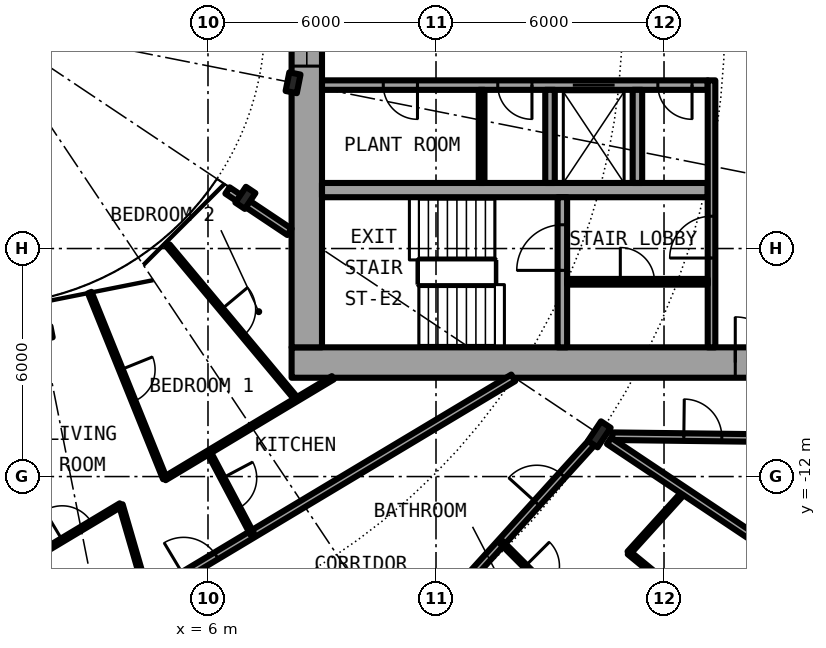
"""IFC4 building model, lengths in metres.
Left out: names, types, materials, properties, quantities, classifications, styles, units other than length and angle.
Written with IfcOpenShell. Run it as: python <this file> out.ifc"""

import sys

from ifc_helpers import new_model, si_unit, direction, frame, frame_2d, origin, origin_2d, place, context, subcontext, project, spatial, rectangle, i_section, extrude, element, fill, save


model = new_model("IFC4")
c1 = context("Model", 3, precision=1e-05, world=origin(), true_north=direction((0.0, 1.0)))
c2 = subcontext(c1, "Body", "Model", "MODEL_VIEW")
j1 = project(units=[si_unit("LENGTHUNIT", "METRE"), si_unit("PLANEANGLEUNIT", "RADIAN")], contexts=[c1])
p1 = place(None, origin())
s1 = spatial("IfcSite", under=j1, at=p1, CompositionType="ELEMENT")
p2 = place(p1, origin())
s2 = spatial("IfcBuilding", under=s1, at=p2, CompositionType="ELEMENT")
p3 = place(p2, frame((0.0, 0.0, 50.25)))
s3 = spatial("IfcBuildingStorey", under=s2, at=p3, CompositionType="ELEMENT", Elevation=50.25)
p4 = place(p3, frame((16.297, -10.889, 0.0), z_axis=(0.0, 0.0, 1.0), x_axis=(0.831469612303, -0.55557023302, 0.0)))
e1 = element("IfcColumn", 1, at=p4, inside=s3, PredefinedType="COLUMN", context=c2, shape_type="SweptSolid", body=[
    extrude(i_section(OverallWidth=0.305, OverallDepth=0.62, WebThickness=0.021, FlangeThickness=0.04, FilletRadius=0.027, at=origin_2d()), origin(), (0.0, 0.0, 1.0), 3.05),
])
for number, where, z_axis, x_axis in (
    (2, (1.639, -8.239, 0.0), (0.0, 0.0, 1.0), (0.195, -0.981, 0.0)),
    (3, (6.984, -4.667, 0.0), (0.0, 0.0, 1.0), (0.831, -0.556, 0.0)),
    (4, (8.239, -1.639, 0.0), (0.0, 0.0, 1.0), (0.981, -0.195, 0.0)),
):
    element("IfcColumn", number, at=place(p3, frame(where, z_axis=z_axis, x_axis=x_axis)), inside=s3, PredefinedType="COLUMN", context=c2, shape_type="SweptSolid", body=[
        extrude(i_section(OverallWidth=0.3, OverallDepth=0.5, WebThickness=0.014, FlangeThickness=0.028, FilletRadius=0.027, at=origin_2d()), origin(), (0.0, 0.0, 1.0), 3.05),
    ])
p5 = place(p3, frame((8.2, -9.0, 0.0), z_axis=(0.0, 0.0, 1.0), x_axis=(1.0, 0.0, 0.0)))
e5 = element("IfcWall", 5, at=p5, inside=s3, PredefinedType="SHEAR", context=c2, shape_type="SweptSolid", body=[
    extrude(rectangle(XDim=14.2, YDim=0.8, at=frame_2d((7.1, 0.0))), origin(), (0.0, 0.0, 1.0), 3.05),
])
p6 = place(p5, frame((11.675, 0.0, 0.0)))
e6 = element("IfcOpeningElement", 6, at=p6, cuts=e5, PredefinedType="OPENING", context=c2, shape_type="SweptSolid", body=[
    extrude(rectangle(XDim=1.2, YDim=2.3, at=frame_2d((0.6, 1.15))), frame((0.0, 0.41, 0.0), z_axis=(0.0, -1.0, 0.0), x_axis=(1.0, 0.0, 0.0)), (0.0, 0.0, 1.0), 0.82),
])
p7 = place(p3, frame((8.6, -8.6, 0.0), z_axis=(0.0, 0.0, 1.0), x_axis=(0.0, 1.0, 0.0)))
e7 = element("IfcWall", 7, at=p7, inside=s3, PredefinedType="SHEAR", context=c2, shape_type="SweptSolid", body=[
    extrude(rectangle(XDim=17.2, YDim=0.8, at=frame_2d((8.6, 0.0))), origin(), (0.0, 0.0, 1.0), 3.05),
])
p8 = place(p7, frame((7.4, 0.0, 0.1)))
e8 = element("IfcOpeningElement", 8, at=p8, cuts=e7, PredefinedType="OPENING", context=c2, shape_type="SweptSolid", body=[
    extrude(rectangle(XDim=2.4, YDim=2.2, at=frame_2d((1.2, 1.1))), frame((0.0, 0.41, 0.0), z_axis=(0.0, -1.0, 0.0), x_axis=(1.0, 0.0, 0.0)), (0.0, 0.0, 1.0), 0.82),
])
p9 = place(p3, frame((19.15, -1.7, 0.0), z_axis=(0.0, 0.0, 1.0), x_axis=(-1.0, 0.0, 0.0)))
e9 = element("IfcWall", 9, at=p9, inside=s3, PredefinedType="SHEAR", context=c2, shape_type="SweptSolid", body=[
    extrude(rectangle(XDim=10.15, YDim=0.25, at=frame_2d((5.075, 0.0))), origin(), (0.0, 0.0, 1.0), 3.05),
])
p10 = place(p9, frame((2.45, 0.0, 0.0)))
e10 = element("IfcOpeningElement", 10, at=p10, cuts=e9, PredefinedType="OPENING", context=c2, shape_type="SweptSolid", body=[
    extrude(rectangle(XDim=1.1, YDim=2.3, at=frame_2d((0.55, 1.15))), frame((0.0, 0.135, 0.0), z_axis=(0.0, -1.0, 0.0), x_axis=(1.0, 0.0, 0.0)), (0.0, 0.0, 1.0), 0.27),
])
p11 = place(p9, frame((7.637, 0.0, 0.0)))
e11 = element("IfcOpeningElement", 11, at=p11, cuts=e9, PredefinedType="OPENING", context=c2, shape_type="SweptSolid", body=[
    extrude(rectangle(XDim=0.9, YDim=2.3, at=frame_2d((0.45, 1.15))), frame((0.0, 0.135, 0.0), z_axis=(0.0, -1.0, 0.0), x_axis=(1.0, 0.0, 0.0)), (0.0, 0.0, 1.0), 0.27),
])
p12 = place(p9, frame((4.625, 0.0, 0.0)))
e12 = element("IfcOpeningElement", 12, at=p12, cuts=e9, PredefinedType="OPENING", context=c2, shape_type="SweptSolid", body=[
    extrude(rectangle(XDim=0.9, YDim=2.3, at=frame_2d((0.45, 1.15))), frame((0.0, 0.135, 0.0), z_axis=(0.0, -1.0, 0.0), x_axis=(1.0, 0.0, 0.0)), (0.0, 0.0, 1.0), 0.27),
])
p13 = place(p9, frame((0.413, 0.0, 0.0)))
e13 = element("IfcOpeningElement", 13, at=p13, cuts=e9, PredefinedType="OPENING", context=c2, shape_type="SweptSolid", body=[
    extrude(rectangle(XDim=0.9, YDim=2.3, at=frame_2d((0.45, 1.15))), frame((0.0, 0.135, 0.0), z_axis=(0.0, -1.0, 0.0), x_axis=(1.0, 0.0, 0.0)), (0.0, 0.0, 1.0), 0.27),
])
p14 = place(p3, frame((9.0, -4.462, 0.0), z_axis=(0.0, 0.0, 1.0), x_axis=(1.0, 0.0, 0.0)))
e14 = element("IfcWall", 14, at=p14, inside=s3, PredefinedType="SHEAR", context=c2, shape_type="SweptSolid", body=[
    extrude(rectangle(XDim=10.15, YDim=0.375, at=frame_2d((5.075, 0.0))), origin(), (0.0, 0.0, 1.0), 3.05),
])
p15 = place(p3, frame((15.325, -8.6, 0.0), z_axis=(0.0, 0.0, 1.0), x_axis=(0.0, 1.0, 0.0)))
e15 = element("IfcWall", 15, at=p15, inside=s3, PredefinedType="SHEAR", context=c2, shape_type="SweptSolid", body=[
    extrude(rectangle(XDim=3.95, YDim=0.25, at=frame_2d((1.975, 0.0))), origin(), (0.0, 0.0, 1.0), 3.05),
])
p16 = place(p15, frame((2.025, 0.0, 0.0)))
e16 = element("IfcOpeningElement", 16, at=p16, cuts=e15, PredefinedType="OPENING", context=c2, shape_type="SweptSolid", body=[
    extrude(rectangle(XDim=1.2, YDim=2.3, at=frame_2d((0.6, 1.15))), frame((0.0, 0.135, 0.0), z_axis=(0.0, -1.0, 0.0), x_axis=(1.0, 0.0, 0.0)), (0.0, 0.0, 1.0), 0.27),
])
for number, where, z_axis, x_axis in (
    (17, (15.0, -1.825, 0.0), (0.0, 0.0, 1.0), (0.0, -1.0, 0.0)),
    (18, (17.3, -1.825, 0.0), (0.0, 0.0, 1.0), (0.0, -1.0, 0.0)),
):
    element("IfcWall", number, at=place(p3, frame(where, z_axis=z_axis, x_axis=x_axis)), inside=s3, PredefinedType="SOLIDWALL", context=c2, shape_type="SweptSolid", body=[
        extrude(rectangle(XDim=2.45, YDim=0.25, at=frame_2d((1.225, 0.0))), origin(), (0.0, 0.0, 1.0), 2.7),
    ])
p17 = place(p3, frame((19.25, -8.6, 0.0), z_axis=(0.0, 0.0, 1.0), x_axis=(0.0, 1.0, 0.0)))
e19 = element("IfcWall", 19, at=p17, inside=s3, PredefinedType="SOLIDWALL", context=c2, shape_type="SweptSolid", body=[
    extrude(rectangle(XDim=7.025, YDim=0.2, at=frame_2d((3.513, 0.0))), origin(), (0.0, 0.0, 1.0), 2.7),
])
p18 = place(p17, frame((2.35, 0.0, 0.0)))
e20 = element("IfcOpeningElement", 20, at=p18, cuts=e19, PredefinedType="OPENING", context=c2, shape_type="SweptSolid", body=[
    extrude(rectangle(XDim=1.1, YDim=2.3, at=frame_2d((0.55, 1.15))), frame((0.0, 0.11, 0.0), z_axis=(0.0, -1.0, 0.0), x_axis=(1.0, 0.0, 0.0)), (0.0, 0.0, 1.0), 0.22),
])
p19 = place(p3, frame((13.2, -1.825, 0.0), z_axis=(0.0, 0.0, 1.0), x_axis=(0.0, -1.0, 0.0)))
e21 = element("IfcWall", 21, at=p19, inside=s3, PredefinedType="PARTITIONING", context=c2, shape_type="SweptSolid", body=[
    extrude(rectangle(XDim=2.45, YDim=0.15, at=frame_2d((1.225, 0.0))), origin(), (0.0, 0.0, 1.0), 2.7),
])
p20 = place(p3, frame((15.45, -6.875, 0.0), z_axis=(0.0, 0.0, 1.0), x_axis=(1.0, 0.0, 0.0)))
e22 = element("IfcWall", 22, at=p20, inside=s3, PredefinedType="PARTITIONING", context=c2, shape_type="SweptSolid", body=[
    extrude(rectangle(XDim=3.7, YDim=0.15, at=frame_2d((1.85, 0.0))), origin(), (0.0, 0.0, 1.0), 2.7),
])
p21 = place(p20, frame((1.4, 0.0, 0.0)))
e23 = element("IfcOpeningElement", 23, at=p21, cuts=e22, PredefinedType="OPENING", context=c2, shape_type="SweptSolid", body=[
    extrude(rectangle(XDim=0.9, YDim=2.3, at=frame_2d((0.45, 1.15))), frame((0.0, 0.085, 0.0), z_axis=(0.0, -1.0, 0.0), x_axis=(1.0, 0.0, 0.0)), (0.0, 0.0, 1.0), 0.17),
])
p22 = place(p3, frame((17.077, -14.006, 0.0), z_axis=(0.0, 0.0, 1.0), x_axis=(0.671396556615, 0.741098282123, 0.0)))
e24 = element("IfcWall", 24, at=p22, inside=s3, PredefinedType="PARTITIONING", context=c2, shape_type="SweptSolid", body=[
    extrude(rectangle(XDim=2.182, YDim=0.1, at=frame_2d((1.091, 0.0))), origin(), (0.0, 0.0, 1.0), 2.7),
])
p23 = place(p3, frame((12.434, -15.151, 0.0), z_axis=(0.0, 0.0, 1.0), x_axis=(0.671514934772, 0.740991020444, 0.0)))
e25 = element("IfcWall", 25, at=p23, inside=s3, PredefinedType="PARTITIONING", context=c2, shape_type="SweptSolid", body=[
    extrude(rectangle(XDim=5.598, YDim=0.2, at=frame_2d((2.799, 0.0))), origin(), (0.0, 0.0, 1.0), 2.38),
])
p24 = place(p23, frame((3.305, 0.0, 0.0)))
e26 = element("IfcOpeningElement", 26, at=p24, cuts=e25, PredefinedType="OPENING", context=c2, shape_type="SweptSolid", body=[
    extrude(rectangle(XDim=1.0, YDim=2.3, at=frame_2d((0.5, 1.15))), frame((0.0, 0.11, 0.0), z_axis=(0.0, -1.0, 0.0), x_axis=(1.0, 0.0, 0.0)), (0.0, 0.0, 1.0), 0.22),
])
p25 = place(p3, frame((1.656, -16.819, 0.0), z_axis=(0.0, 0.0, 1.0), x_axis=(0.857773470126, 0.514027892189, 0.0)))
e27 = element("IfcWall", 27, at=p25, inside=s3, PredefinedType="PARTITIONING", context=c2, shape_type="SweptSolid", body=[
    extrude(rectangle(XDim=14.429, YDim=0.2, at=frame_2d((7.215, 0.0))), origin(), (0.0, 0.0, 1.0), 2.7),
])
p26 = place(p25, frame((4.318, 0.0, 0.0)))
e28 = element("IfcOpeningElement", 28, at=p26, cuts=e27, PredefinedType="OPENING", context=c2, shape_type="SweptSolid", body=[
    extrude(rectangle(XDim=1.0, YDim=2.3, at=frame_2d((0.5, 1.15))), frame((0.0, 0.11, 0.0), z_axis=(0.0, -1.0, 0.0), x_axis=(1.0, 0.0, 0.0)), (0.0, 0.0, 1.0), 0.22),
])
p27 = place(p3, frame((1.388, -14.134, 0.0), z_axis=(0.0, 0.0, 1.0), x_axis=(0.857820034452, 0.513950180945, 0.0)))
e29 = element("IfcWall", 29, at=p27, inside=s3, PredefinedType="PARTITIONING", context=c2, shape_type="SweptSolid", body=[
    extrude(rectangle(XDim=2.699, YDim=0.1, at=frame_2d((1.349, 0.0))), origin(), (0.0, 0.0, 1.0), 2.7),
])
p28 = place(p27, frame((0.904, 0.0, 0.0)))
e30 = element("IfcOpeningElement", 30, at=p28, cuts=e29, PredefinedType="OPENING", context=c2, shape_type="SweptSolid", body=[
    extrude(rectangle(XDim=0.9, YDim=2.3, at=frame_2d((0.45, 1.15))), frame((0.0, 0.06, 0.0), z_axis=(0.0, -1.0, 0.0), x_axis=(1.0, 0.0, 0.0)), (0.0, 0.0, 1.0), 0.12),
])
p29 = place(p3, frame((4.86, -12.053, 0.0), z_axis=(0.0, 0.0, 1.0), x_axis=(0.857697418837, 0.514154779926, 0.0)))
e31 = element("IfcWall", 31, at=p29, inside=s3, PredefinedType="PARTITIONING", context=c2, shape_type="SweptSolid", body=[
    extrude(rectangle(XDim=5.16, YDim=0.1, at=frame_2d((2.58, 0.0))), origin(), (0.0, 0.0, 1.0), 2.7),
])
p30 = place(p3, frame((16.637, -10.938, 0.0), z_axis=(0.0, 0.0, 1.0), x_axis=(0.99992425795, -0.012307654658, 0.0)))
e32 = element("IfcWall", 32, at=p30, inside=s3, PredefinedType="PARTITIONING", context=c2, shape_type="SweptSolid", body=[
    extrude(rectangle(XDim=5.039, YDim=0.2, at=frame_2d((2.519, 0.0))), origin(), (0.0, 0.0, 1.0), 2.7),
])
p31 = place(p30, frame((1.884, 0.0, 0.0)))
e33 = element("IfcOpeningElement", 33, at=p31, cuts=e32, PredefinedType="OPENING", context=c2, shape_type="SweptSolid", body=[
    extrude(rectangle(XDim=1.0, YDim=2.3, at=frame_2d((0.5, 1.15))), frame((0.0, 0.11, 0.0), z_axis=(0.0, -1.0, 0.0), x_axis=(1.0, 0.0, 0.0)), (0.0, 0.0, 1.0), 0.22),
])
p32 = place(p3, frame((6.513, -4.472, 0.0), z_axis=(0.0, 0.0, 1.0), x_axis=(0.831417956244, -0.555647533996, 0.0)))
e34 = element("IfcWall", 34, at=p32, inside=s3, PredefinedType="PARTITIONING", context=c2, shape_type="SweptSolid", body=[
    extrude(rectangle(XDim=1.962, YDim=0.2, at=frame_2d((0.981, 0.0))), origin(), (0.0, 0.0, 1.0), 2.7),
])
p33 = place(p3, frame((2.889, -7.159, 0.0), z_axis=(0.0, 0.0, 1.0), x_axis=(0.374372761824, -0.927278294367, 0.0)))
e35 = element("IfcWall", 35, at=p33, inside=s3, PredefinedType="PARTITIONING", context=c2, shape_type="SweptSolid", body=[
    extrude(rectangle(XDim=5.276, YDim=0.1, at=frame_2d((2.638, 0.0))), origin(), (0.0, 0.0, 1.0), 2.7),
])
p34 = place(p33, frame((2.188, 0.0, 0.0)))
e36 = element("IfcOpeningElement", 36, at=p34, cuts=e35, PredefinedType="OPENING", context=c2, shape_type="SweptSolid", body=[
    extrude(rectangle(XDim=0.9, YDim=2.3, at=frame_2d((0.45, 1.15))), frame((0.0, 0.06, 0.0), z_axis=(0.0, -1.0, 0.0), x_axis=(1.0, 0.0, 0.0)), (0.0, 0.0, 1.0), 0.12),
])
p35 = place(p3, frame((3.706, -12.744, 0.0), z_axis=(0.0, 0.0, 1.0), x_axis=(0.279201466266, -0.960232545395, 0.0)))
e37 = element("IfcWall", 37, at=p35, inside=s3, PredefinedType="PARTITIONING", context=c2, shape_type="SweptSolid", body=[
    extrude(rectangle(XDim=2.524, YDim=0.1, at=frame_2d((1.262, 0.0))), origin(), (0.0, 0.0, 1.0), 2.7),
])
p36 = place(p3, frame((4.952, -5.923, 0.0), z_axis=(0.0, 0.0, 1.0), x_axis=(0.641376424834, -0.767226356213, 0.0)))
e38 = element("IfcWall", 38, at=p36, inside=s3, PredefinedType="PARTITIONING", context=c2, shape_type="SweptSolid", body=[
    extrude(rectangle(XDim=5.275, YDim=0.1, at=frame_2d((2.637, 0.0))), origin(), (0.0, 0.0, 1.0), 2.7),
])
p37 = place(p36, frame((2.187, 0.0, 0.0)))
e39 = element("IfcOpeningElement", 39, at=p37, cuts=e38, PredefinedType="OPENING", context=c2, shape_type="SweptSolid", body=[
    extrude(rectangle(XDim=0.9, YDim=2.3, at=frame_2d((0.45, 1.15))), frame((0.0, 0.06, 0.0), z_axis=(0.0, -1.0, 0.0), x_axis=(1.0, 0.0, 0.0)), (0.0, 0.0, 1.0), 0.12),
])
p38 = place(p3, frame((6.021, -11.357, 0.0), z_axis=(0.0, 0.0, 1.0), x_axis=(0.468337293896, -0.883549760425, 0.0)))
e40 = element("IfcWall", 40, at=p38, inside=s3, PredefinedType="PARTITIONING", context=c2, shape_type="SweptSolid", body=[
    extrude(rectangle(XDim=2.445, YDim=0.1, at=frame_2d((1.222, 0.0))), origin(), (0.0, 0.0, 1.0), 2.7),
])
p39 = place(p38, frame((0.772, 0.0, 0.0)))
e41 = element("IfcOpeningElement", 41, at=p39, cuts=e40, PredefinedType="OPENING", context=c2, shape_type="SweptSolid", body=[
    extrude(rectangle(XDim=0.9, YDim=2.3, at=frame_2d((0.45, 1.15))), frame((0.0, 0.06, 0.0), z_axis=(0.0, -1.0, 0.0), x_axis=(1.0, 0.0, 0.0)), (0.0, 0.0, 1.0), 0.12),
])
p40 = place(p3, frame((13.722, -13.73, 0.0), z_axis=(0.0, 0.0, 1.0), x_axis=(0.706741540154, -0.707471833659, 0.0)))
e42 = element("IfcWall", 42, at=p40, inside=s3, PredefinedType="PARTITIONING", context=c2, shape_type="SweptSolid", body=[
    extrude(rectangle(XDim=2.674, YDim=0.1, at=frame_2d((1.337, 0.0))), origin(), (0.0, 0.0, 1.0), 2.7),
])
p41 = place(p40, frame((0.887, 0.0, 0.0)))
e43 = element("IfcOpeningElement", 43, at=p41, cuts=e42, PredefinedType="OPENING", context=c2, shape_type="SweptSolid", body=[
    extrude(rectangle(XDim=0.9, YDim=2.3, at=frame_2d((0.45, 1.15))), frame((0.0, 0.06, 0.0), z_axis=(0.0, -1.0, 0.0), x_axis=(1.0, 0.0, 0.0)), (0.0, 0.0, 1.0), 0.12),
])
p42 = place(p3, frame((16.555, -11.061, 0.0), z_axis=(0.0, 0.0, 1.0), x_axis=(0.831465568067, -0.555576285599, 0.0)))
e44 = element("IfcWall", 44, at=p42, inside=s3, PredefinedType="PARTITIONING", context=c2, shape_type="SweptSolid", body=[
    extrude(rectangle(XDim=7.264, YDim=0.2, at=frame_2d((3.632, 0.0))), origin(), (0.0, 0.0, 1.0), 2.7),
])
p43 = place(p3, frame((17.077, -14.006, 0.0), z_axis=(0.0, 0.0, 1.0), x_axis=(0.77326214499, -0.634086472908, 0.0)))
e45 = element("IfcWall", 45, at=p43, inside=s3, PredefinedType="PARTITIONING", context=c2, shape_type="SweptSolid", body=[
    extrude(rectangle(XDim=5.089, YDim=0.1, at=frame_2d((2.544, 0.0))), origin(), (0.0, 0.0, 1.0), 2.7),
])
p44 = place(p43, frame((2.094, 0.0, 0.0)))
e46 = element("IfcOpeningElement", 46, at=p44, cuts=e45, PredefinedType="OPENING", context=c2, shape_type="SweptSolid", body=[
    extrude(rectangle(XDim=0.9, YDim=2.3, at=frame_2d((0.45, 1.15))), frame((0.0, 0.06, 0.0), z_axis=(0.0, -1.0, 0.0), x_axis=(1.0, 0.0, 0.0)), (0.0, 0.0, 1.0), 0.12),
])
p45 = place(p10, origin())
e47 = element("IfcDoor", 47, at=p45, inside=s3, OperationType="DOUBLE_DOOR_SLIDING", PredefinedType="DOOR", context=c2, shape_type="SweptSolid", body=[
    extrude(rectangle(XDim=1.1, YDim=2.3, at=frame_2d((0.55, 1.15))), frame((0.0, 0.025, 0.0), z_axis=(0.0, -1.0, 0.0), x_axis=(1.0, 0.0, 0.0)), (0.0, 0.0, 1.0), 0.05),
])
fill(e10, e47)
p46 = place(p11, origin())
e48 = element("IfcDoor", 48, at=p46, inside=s3, OperationType="SINGLE_SWING_LEFT", PredefinedType="DOOR", context=c2, shape_type="SweptSolid", body=[
    extrude(rectangle(XDim=0.9, YDim=2.3, at=frame_2d((0.45, 1.15))), frame((0.0, 0.025, 0.0), z_axis=(0.0, -1.0, 0.0), x_axis=(1.0, 0.0, 0.0)), (0.0, 0.0, 1.0), 0.05),
])
fill(e11, e48)
p47 = place(p12, origin())
e49 = element("IfcDoor", 49, at=p47, inside=s3, OperationType="SINGLE_SWING_LEFT", PredefinedType="DOOR", context=c2, shape_type="SweptSolid", body=[
    extrude(rectangle(XDim=0.9, YDim=2.3, at=frame_2d((0.45, 1.15))), frame((0.0, 0.025, 0.0), z_axis=(0.0, -1.0, 0.0), x_axis=(1.0, 0.0, 0.0)), (0.0, 0.0, 1.0), 0.05),
])
fill(e12, e49)
p48 = place(p13, origin())
e50 = element("IfcDoor", 50, at=p48, inside=s3, OperationType="SINGLE_SWING_RIGHT", PredefinedType="DOOR", context=c2, shape_type="SweptSolid", body=[
    extrude(rectangle(XDim=0.9, YDim=2.3, at=frame_2d((0.45, 1.15))), frame((0.0, 0.025, 0.0), z_axis=(0.0, -1.0, 0.0), x_axis=(1.0, 0.0, 0.0)), (0.0, 0.0, 1.0), 0.05),
])
fill(e13, e50)
p49 = place(p21, origin())
e51 = element("IfcDoor", 51, at=p49, inside=s3, OperationType="SINGLE_SWING_LEFT", PredefinedType="DOOR", context=c2, shape_type="SweptSolid", body=[
    extrude(rectangle(XDim=0.9, YDim=2.3, at=frame_2d((0.45, 1.15))), frame((0.0, 0.025, 0.0), z_axis=(0.0, -1.0, 0.0), x_axis=(1.0, 0.0, 0.0)), (0.0, 0.0, 1.0), 0.05),
])
fill(e23, e51)
p50 = place(p16, origin())
e52 = element("IfcDoor", 52, at=p50, inside=s3, OperationType="SINGLE_SWING_LEFT", PredefinedType="DOOR", context=c2, shape_type="SweptSolid", body=[
    extrude(rectangle(XDim=1.2, YDim=2.3, at=frame_2d((0.6, 1.15))), frame((0.0, 0.025, 0.0), z_axis=(0.0, -1.0, 0.0), x_axis=(1.0, 0.0, 0.0)), (0.0, 0.0, 1.0), 0.05),
])
fill(e16, e52)
p51 = place(p18, origin())
e53 = element("IfcDoor", 53, at=p51, inside=s3, OperationType="SINGLE_SWING_RIGHT", PredefinedType="DOOR", context=c2, shape_type="SweptSolid", body=[
    extrude(rectangle(XDim=1.1, YDim=2.3, at=frame_2d((0.55, 1.15))), frame((0.0, 0.025, 0.0), z_axis=(0.0, -1.0, 0.0), x_axis=(1.0, 0.0, 0.0)), (0.0, 0.0, 1.0), 0.05),
])
fill(e20, e53)
p52 = place(p6, origin())
e54 = element("IfcDoor", 54, at=p52, inside=s3, OperationType="SINGLE_SWING_LEFT", PredefinedType="DOOR", context=c2, shape_type="SweptSolid", body=[
    extrude(rectangle(XDim=1.2, YDim=2.3, at=frame_2d((0.6, 1.15))), frame((0.0, 0.025, 0.0), z_axis=(0.0, -1.0, 0.0), x_axis=(1.0, 0.0, 0.0)), (0.0, 0.0, 1.0), 0.05),
])
fill(e6, e54)
p53 = place(p8, origin())
e55 = element("IfcWindow", 55, at=p53, inside=s3, PartitioningType="SINGLE_PANEL", PredefinedType="WINDOW", context=c2, shape_type="SweptSolid", body=[
    extrude(rectangle(XDim=2.4, YDim=2.2, at=frame_2d((1.2, 1.1))), frame((0.0, 0.03, 0.0), z_axis=(0.0, -1.0, 0.0), x_axis=(1.0, 0.0, 0.0)), (0.0, 0.0, 1.0), 0.06),
])
fill(e8, e55)
p54 = place(p24, origin())
e56 = element("IfcDoor", 56, at=p54, inside=s3, OperationType="SINGLE_SWING_RIGHT", PredefinedType="DOOR", context=c2, shape_type="SweptSolid", body=[
    extrude(rectangle(XDim=1.0, YDim=2.3, at=frame_2d((0.5, 1.15))), frame((0.0, 0.025, 0.0), z_axis=(0.0, -1.0, 0.0), x_axis=(1.0, 0.0, 0.0)), (0.0, 0.0, 1.0), 0.05),
])
fill(e26, e56)
p55 = place(p41, origin())
e57 = element("IfcDoor", 57, at=p55, inside=s3, OperationType="SINGLE_SWING_RIGHT", PredefinedType="DOOR", context=c2, shape_type="SweptSolid", body=[
    extrude(rectangle(XDim=0.9, YDim=2.3, at=frame_2d((0.45, 1.15))), frame((0.0, 0.025, 0.0), z_axis=(0.0, -1.0, 0.0), x_axis=(1.0, 0.0, 0.0)), (0.0, 0.0, 1.0), 0.05),
])
fill(e43, e57)
p56 = place(p26, origin())
e58 = element("IfcDoor", 58, at=p56, inside=s3, OperationType="SINGLE_SWING_LEFT", PredefinedType="DOOR", context=c2, shape_type="SweptSolid", body=[
    extrude(rectangle(XDim=1.0, YDim=2.3, at=frame_2d((0.5, 1.15))), frame((0.0, 0.025, 0.0), z_axis=(0.0, -1.0, 0.0), x_axis=(1.0, 0.0, 0.0)), (0.0, 0.0, 1.0), 0.05),
])
fill(e28, e58)
p57 = place(p28, origin())
e59 = element("IfcDoor", 59, at=p57, inside=s3, OperationType="SINGLE_SWING_RIGHT", PredefinedType="DOOR", context=c2, shape_type="SweptSolid", body=[
    extrude(rectangle(XDim=0.9, YDim=2.3, at=frame_2d((0.45, 1.15))), frame((0.0, 0.025, 0.0), z_axis=(0.0, -1.0, 0.0), x_axis=(1.0, 0.0, 0.0)), (0.0, 0.0, 1.0), 0.05),
])
fill(e30, e59)
p58 = place(p39, origin())
e60 = element("IfcDoor", 60, at=p58, inside=s3, OperationType="SINGLE_SWING_RIGHT", PredefinedType="DOOR", context=c2, shape_type="SweptSolid", body=[
    extrude(rectangle(XDim=0.9, YDim=2.3, at=frame_2d((0.45, 1.15))), frame((0.0, 0.025, 0.0), z_axis=(0.0, -1.0, 0.0), x_axis=(1.0, 0.0, 0.0)), (0.0, 0.0, 1.0), 0.05),
])
fill(e41, e60)
p59 = place(p34, origin())
e61 = element("IfcDoor", 61, at=p59, inside=s3, OperationType="SINGLE_SWING_RIGHT", PredefinedType="DOOR", context=c2, shape_type="SweptSolid", body=[
    extrude(rectangle(XDim=0.9, YDim=2.3, at=frame_2d((0.45, 1.15))), frame((0.0, 0.025, 0.0), z_axis=(0.0, -1.0, 0.0), x_axis=(1.0, 0.0, 0.0)), (0.0, 0.0, 1.0), 0.05),
])
fill(e36, e61)
p60 = place(p37, origin())
e62 = element("IfcDoor", 62, at=p60, inside=s3, OperationType="SINGLE_SWING_RIGHT", PredefinedType="DOOR", context=c2, shape_type="SweptSolid", body=[
    extrude(rectangle(XDim=0.9, YDim=2.3, at=frame_2d((0.45, 1.15))), frame((0.0, 0.025, 0.0), z_axis=(0.0, -1.0, 0.0), x_axis=(1.0, 0.0, 0.0)), (0.0, 0.0, 1.0), 0.05),
])
fill(e39, e62)
p61 = place(p31, origin())
e63 = element("IfcDoor", 63, at=p61, inside=s3, OperationType="SINGLE_SWING_LEFT", PredefinedType="DOOR", context=c2, shape_type="SweptSolid", body=[
    extrude(rectangle(XDim=1.0, YDim=2.3, at=frame_2d((0.5, 1.15))), frame((0.0, 0.025, 0.0), z_axis=(0.0, -1.0, 0.0), x_axis=(1.0, 0.0, 0.0)), (0.0, 0.0, 1.0), 0.05),
])
fill(e33, e63)
save(model, sys.argv[1])
